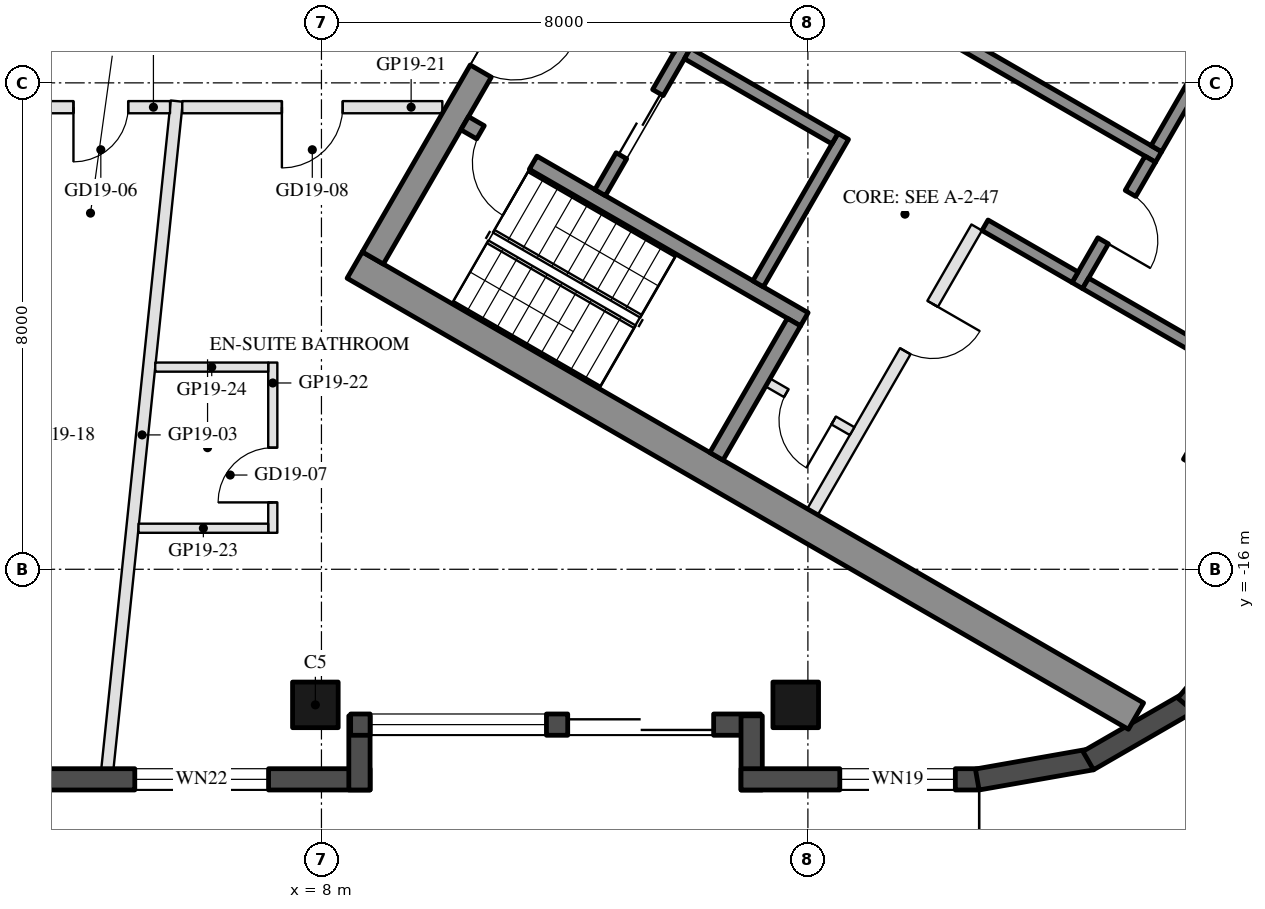
"""IFC4 building model, lengths in metres.
Left out: names, types, materials, properties, quantities, classifications, styles, units other than length and angle.
Written with IfcOpenShell. Run it as: python <this file> out.ifc"""

import sys

from ifc_helpers import new_model, si_unit, direction, frame, frame_2d, origin, origin_2d, place, context, subcontext, project, spatial, rectangle, hollow_rectangle, extrude, element, fill, save


model = new_model("IFC4")
c1 = context("Model", 3, precision=1e-05, world=origin(), true_north=direction((0.0, 1.0)))
c2 = subcontext(c1, "Body", "Model", "MODEL_VIEW")
j1 = project(units=[si_unit("LENGTHUNIT", "METRE"), si_unit("PLANEANGLEUNIT", "RADIAN")], contexts=[c1])
p1 = place(None, origin())
s1 = spatial("IfcSite", under=j1, at=p1, CompositionType="ELEMENT")
p2 = place(p1, origin())
s2 = spatial("IfcBuilding", under=s1, at=p2, CompositionType="ELEMENT")
p3 = place(p2, frame((0.0, 0.0, 205.8)))
s3 = spatial("IfcBuildingStorey", under=s2, at=p3, CompositionType="ELEMENT", Elevation=205.8)
for number, where, z_axis, x_axis in (
    (1, (7.9, -18.23, 0.0), (0.0, 0.0, 1.0), (-1.0, 0.0, 0.0)),
    (2, (15.8, -18.23, 0.0), (0.0, 0.0, 1.0), (-1.0, 0.0, 0.0)),
):
    element("IfcColumn", number, at=place(p3, frame(where, z_axis=z_axis, x_axis=x_axis)), inside=s3, PredefinedType="COLUMN", context=c2, shape_type="SweptSolid", body=[
        extrude(hollow_rectangle(XDim=0.75, YDim=0.75, WallThickness=0.035, at=origin_2d()), origin(), (0.0, 0.0, 1.0), 3.7),
    ])
p4 = place(p3, frame((23.729, -13.7, 0.0), z_axis=(0.0, 0.0, 1.0), x_axis=(0.5, 0.866025403784, 0.0)))
e3 = element("IfcColumn", 3, at=p4, inside=s3, PredefinedType="COLUMN", context=c2, shape_type="SweptSolid", body=[
    extrude(hollow_rectangle(XDim=2.4, YDim=2.2, WallThickness=0.06, at=origin_2d()), origin(), (0.0, 0.0, 1.0), 3.7),
])
p5 = place(p3, frame((-0.9, -19.455, 0.0), z_axis=(0.0, 0.0, 1.0), x_axis=(1.0, 0.0, 0.0)))
e4 = element("IfcWall", 4, at=p5, inside=s3, PredefinedType="SOLIDWALL", context=c2, shape_type="SweptSolid", body=[
    extrude(rectangle(XDim=9.7, YDim=0.35, at=frame_2d((4.85, 0.0))), origin(), (0.0, 0.0, 1.0), 3.55),
])
p6 = place(p5, frame((5.83, 0.0, 0.3)))
e5 = element("IfcOpeningElement", 5, at=p6, cuts=e4, PredefinedType="OPENING", context=c2, shape_type="SweptSolid", body=[
    extrude(rectangle(XDim=2.2, YDim=2.65, at=frame_2d((1.1, 1.325))), frame((0.0, 0.185, 0.0), z_axis=(0.0, -1.0, 0.0), x_axis=(1.0, 0.0, 0.0)), (0.0, 0.0, 1.0), 0.37),
])
p7 = place(p3, frame((8.625, -19.63, 0.0), z_axis=(0.0, 0.0, 1.0), x_axis=(0.0, 1.0, 0.0)))
e6 = element("IfcWall", 6, at=p7, inside=s3, PredefinedType="SOLIDWALL", context=c2, shape_type="SweptSolid", body=[
    extrude(rectangle(XDim=1.22, YDim=0.35, at=frame_2d((0.61, 0.0))), origin(), (0.0, 0.0, 1.0), 3.55),
])
p8 = place(p3, frame((8.48, -18.555, 0.0), z_axis=(0.0, 0.0, 1.0), x_axis=(1.0, 0.0, 0.0)))
e7 = element("IfcWall", 7, at=p8, inside=s3, PredefinedType="SOLIDWALL", context=c2, shape_type="SweptSolid", body=[
    extrude(rectangle(XDim=6.74, YDim=0.35, at=frame_2d((3.37, 0.0))), origin(), (0.0, 0.0, 1.0), 3.55),
])
p9 = place(p8, frame((3.57, 0.0, 0.0)))
e8 = element("IfcOpeningElement", 8, at=p9, cuts=e7, PredefinedType="OPENING", context=c2, shape_type="SweptSolid", body=[
    extrude(rectangle(XDim=2.4, YDim=2.4, at=frame_2d((1.2, 1.2))), frame((0.0, 0.185, 0.0), z_axis=(0.0, -1.0, 0.0), x_axis=(1.0, 0.0, 0.0)), (0.0, 0.0, 1.0), 0.37),
])
p10 = place(p8, frame((0.32, 0.0, 0.3)))
e9 = element("IfcOpeningElement", 9, at=p10, cuts=e7, PredefinedType="OPENING", context=c2, shape_type="SweptSolid", body=[
    extrude(rectangle(XDim=2.9, YDim=2.65, at=frame_2d((1.45, 1.325))), frame((0.0, 0.185, 0.0), z_axis=(0.0, -1.0, 0.0), x_axis=(1.0, 0.0, 0.0)), (0.0, 0.0, 1.0), 0.37),
])
p11 = place(p3, frame((15.075, -18.41, 0.0), z_axis=(0.0, 0.0, 1.0), x_axis=(0.0, -1.0, 0.0)))
e10 = element("IfcWall", 10, at=p11, inside=s3, PredefinedType="SOLIDWALL", context=c2, shape_type="SweptSolid", body=[
    extrude(rectangle(XDim=1.22, YDim=0.35, at=frame_2d((0.61, 0.0))), origin(), (0.0, 0.0, 1.0), 3.55),
])
p12 = place(p3, frame((14.9, -19.455, 0.0), z_axis=(0.0, 0.0, 1.0), x_axis=(1.0, 0.0, 0.0)))
e11 = element("IfcWall", 11, at=p12, inside=s3, PredefinedType="SOLIDWALL", context=c2, shape_type="SweptSolid", body=[
    extrude(rectangle(XDim=3.916, YDim=0.35, at=frame_2d((1.958, 0.0))), origin(), (0.0, 0.0, 1.0), 3.55),
])
p13 = place(p12, frame((1.625, 0.0, 0.3)))
e12 = element("IfcOpeningElement", 12, at=p13, cuts=e11, PredefinedType="OPENING", context=c2, shape_type="SweptSolid", body=[
    extrude(rectangle(XDim=1.9, YDim=2.65, at=frame_2d((0.95, 1.325))), frame((0.0, 0.185, 0.0), z_axis=(0.0, -1.0, 0.0), x_axis=(1.0, 0.0, 0.0)), (0.0, 0.0, 1.0), 0.37),
])
p14 = place(p3, frame((18.785, -19.458, 0.0), z_axis=(0.0, 0.0, 1.0), x_axis=(0.984798995425, 0.173697837091, 0.0)))
e13 = element("IfcWall", 13, at=p14, inside=s3, PredefinedType="SOLIDWALL", context=c2, shape_type="SweptSolid", body=[
    extrude(rectangle(XDim=1.91, YDim=0.35, at=frame_2d((0.955, 0.0))), origin(), (0.0, 0.0, 1.0), 3.55),
])
for number, where, z_axis, x_axis in (
    (14, (20.61, -19.147, 0.0), (0.0, 0.0, 1.0), (0.866, 0.5, 0.0)),
    (15, (22.217, -18.231, 0.0), (0.0, 0.0, 1.0), (0.643, 0.766, 0.0)),
):
    element("IfcWall", number, at=place(p3, frame(where, z_axis=z_axis, x_axis=x_axis)), inside=s3, PredefinedType="SOLIDWALL", context=c2, shape_type="SweptSolid", body=[
        extrude(rectangle(XDim=1.91, YDim=0.35, at=frame_2d((0.955, 0.0))), origin(), (0.0, 0.0, 1.0), 3.55),
    ])
for number, where, z_axis, x_axis in (
    (16, (8.547, -10.997, 0.0), (0.0, 0.0, 1.0), (0.866, -0.5, 0.0)),
    (17, (13.797, -1.903, 0.0), (0.0, 0.0, 1.0), (0.866, -0.5, 0.0)),
):
    element("IfcWall", number, at=place(p3, frame(where, z_axis=z_axis, x_axis=x_axis)), inside=s3, PredefinedType="SHEAR", context=c2, shape_type="SweptSolid", body=[
        extrude(rectangle(XDim=14.837, YDim=0.5, at=frame_2d((7.418, 0.0))), origin(), (0.0, 0.0, 1.0), 3.5),
    ])
p15 = place(p3, frame((8.845, -10.88, 0.0), z_axis=(0.0, 0.0, 1.0), x_axis=(0.500004234368, 0.866022959057, 0.0)))
e18 = element("IfcWall", 18, at=p15, inside=s3, PredefinedType="SHEAR", context=c2, shape_type="SweptSolid", body=[
    extrude(rectangle(XDim=10.0, YDim=0.4, at=frame_2d((5.0, 0.0))), origin(), (0.0, 0.0, 1.0), 3.5),
])
p16 = place(p15, frame((3.55, 0.0, 0.0)))
e19 = element("IfcOpeningElement", 19, at=p16, cuts=e18, PredefinedType="OPENING", context=c2, shape_type="SweptSolid", body=[
    extrude(rectangle(XDim=1.1, YDim=2.1, at=frame_2d((0.55, 1.05))), frame((0.0, 0.21, 0.0), z_axis=(0.0, -1.0, 0.0), x_axis=(1.0, 0.0, 0.0)), (0.0, 0.0, 1.0), 0.42),
])
p17 = place(p15, frame((5.85, 0.0, 0.0)))
e20 = element("IfcOpeningElement", 20, at=p17, cuts=e18, PredefinedType="OPENING", context=c2, shape_type="SweptSolid", body=[
    extrude(rectangle(XDim=1.4, YDim=2.1, at=frame_2d((0.7, 1.05))), frame((0.0, 0.21, 0.0), z_axis=(0.0, -1.0, 0.0), x_axis=(1.0, 0.0, 0.0)), (0.0, 0.0, 1.0), 0.42),
])
p18 = place(p3, frame((10.356, -8.664, 0.0), z_axis=(0.0, 0.0, 1.0), x_axis=(0.866028629588, -0.499994412703, 0.0)))
e21 = element("IfcWall", 21, at=p18, inside=s3, PredefinedType="SHEAR", context=c2, shape_type="SweptSolid", body=[
    extrude(rectangle(XDim=6.45, YDim=0.25, at=frame_2d((3.225, 0.0))), origin(), (0.0, 0.0, 1.0), 3.5),
])
p19 = place(p18, frame((0.3, 0.0, 0.0)))
e22 = element("IfcOpeningElement", 22, at=p19, cuts=e21, PredefinedType="OPENING", context=c2, shape_type="SweptSolid", body=[
    extrude(rectangle(XDim=1.0, YDim=2.1, at=frame_2d((0.5, 1.05))), frame((0.0, 0.135, 0.0), z_axis=(0.0, -1.0, 0.0), x_axis=(1.0, 0.0, 0.0)), (0.0, 0.0, 1.0), 0.27),
])
p20 = place(p3, frame((14.496, -14.143, 0.0), z_axis=(0.0, 0.0, 1.0), x_axis=(0.500062241894, 0.865989465428, 0.0)))
e23 = element("IfcWall", 23, at=p20, inside=s3, PredefinedType="SHEAR", context=c2, shape_type="SweptSolid", body=[
    extrude(rectangle(XDim=2.55, YDim=0.25, at=frame_2d((1.275, 0.0))), origin(), (0.0, 0.0, 1.0), 3.5),
])
p21 = place(p3, frame((15.181, -11.305, 0.0), z_axis=(0.0, 0.0, 1.0), x_axis=(0.49994636267, 0.866056369097, 0.0)))
e24 = element("IfcWall", 24, at=p21, inside=s3, PredefinedType="SHEAR", context=c2, shape_type="SweptSolid", body=[
    extrude(rectangle(XDim=2.8, YDim=0.2, at=frame_2d((1.4, 0.0))), origin(), (0.0, 0.0, 1.0), 3.5),
])
p22 = place(p3, frame((12.583, -9.805, 0.0), z_axis=(0.0, 0.0, 1.0), x_axis=(0.49994636267, 0.866056369097, 0.0)))
e25 = element("IfcWall", 25, at=p22, inside=s3, PredefinedType="SHEAR", context=c2, shape_type="SweptSolid", body=[
    extrude(rectangle(XDim=2.8, YDim=0.2, at=frame_2d((1.4, 0.0))), origin(), (0.0, 0.0, 1.0), 3.5),
])
p23 = place(p22, frame((0.7, 0.0, 0.0)))
e26 = element("IfcOpeningElement", 26, at=p23, cuts=e25, PredefinedType="OPENING", context=c2, shape_type="SweptSolid", body=[
    extrude(rectangle(XDim=1.2, YDim=2.1, at=frame_2d((0.6, 1.05))), frame((0.0, 0.11, 0.0), z_axis=(0.0, -1.0, 0.0), x_axis=(1.0, 0.0, 0.0)), (0.0, 0.0, 1.0), 0.22),
])
p24 = place(p3, frame((11.768, -6.217, 0.0), z_axis=(0.0, 0.0, 1.0), x_axis=(0.866050077142, -0.499957262057, 0.0)))
e27 = element("IfcWall", 27, at=p24, inside=s3, PredefinedType="SHEAR", context=c2, shape_type="SweptSolid", body=[
    extrude(rectangle(XDim=2.4, YDim=0.2, at=frame_2d((1.2, 0.0))), origin(), (0.0, 0.0, 1.0), 3.5),
])
p25 = place(p3, frame((14.02, -7.517, 0.0), z_axis=(0.0, 0.0, 1.0), x_axis=(0.866034573852, -0.49998411664, 0.0)))
e28 = element("IfcWall", 28, at=p25, inside=s3, PredefinedType="SHEAR", context=c2, shape_type="SweptSolid", body=[
    extrude(rectangle(XDim=2.8, YDim=0.2, at=frame_2d((1.4, 0.0))), origin(), (0.0, 0.0, 1.0), 3.5),
])
p26 = place(p3, frame((12.968, -4.138, 0.0), z_axis=(0.0, 0.0, 1.0), x_axis=(0.866028328073, -0.49999493495, 0.0)))
e29 = element("IfcWall", 29, at=p26, inside=s3, PredefinedType="SHEAR", context=c2, shape_type="SweptSolid", body=[
    extrude(rectangle(XDim=10.16, YDim=0.2, at=frame_2d((5.08, 0.0))), origin(), (0.0, 0.0, 1.0), 3.5),
])
p27 = place(p26, frame((4.53, 0.0, 0.0)))
e30 = element("IfcOpeningElement", 30, at=p27, cuts=e29, PredefinedType="OPENING", context=c2, shape_type="SweptSolid", body=[
    extrude(rectangle(XDim=0.9, YDim=2.1, at=frame_2d((0.45, 1.05))), frame((0.0, 0.11, 0.0), z_axis=(0.0, -1.0, 0.0), x_axis=(1.0, 0.0, 0.0)), (0.0, 0.0, 1.0), 0.22),
])
p28 = place(p3, frame((20.43, -11.333, 0.0), z_axis=(0.0, 0.0, 1.0), x_axis=(0.500001309137, 0.866024647952, 0.0)))
e31 = element("IfcWall", 31, at=p28, inside=s3, PredefinedType="SHEAR", context=c2, shape_type="SweptSolid", body=[
    extrude(rectangle(XDim=2.4, YDim=0.2, at=frame_2d((1.2, 0.0))), origin(), (0.0, 0.0, 1.0), 3.5),
])
p29 = place(p28, frame((0.85, 0.0, 0.0)))
e32 = element("IfcOpeningElement", 32, at=p29, cuts=e31, PredefinedType="OPENING", context=c2, shape_type="SweptSolid", body=[
    extrude(rectangle(XDim=0.9, YDim=2.1, at=frame_2d((0.45, 1.05))), frame((0.0, 0.11, 0.0), z_axis=(0.0, -1.0, 0.0), x_axis=(1.0, 0.0, 0.0)), (0.0, 0.0, 1.0), 0.22),
])
p30 = place(p3, frame((18.913, -10.342, 0.0), z_axis=(0.0, 0.0, 1.0), x_axis=(0.866038183914, -0.499977863513, 0.0)))
e33 = element("IfcWall", 33, at=p30, inside=s3, PredefinedType="SHEAR", context=c2, shape_type="SweptSolid", body=[
    extrude(rectangle(XDim=1.71, YDim=0.2, at=frame_2d((0.855, 0.0))), origin(), (0.0, 0.0, 1.0), 3.5),
])
p31 = place(p3, frame((21.73, -9.082, 0.0), z_axis=(0.0, 0.0, 1.0), x_axis=(0.50002537861, 0.866010750942, 0.0)))
e34 = element("IfcWall", 34, at=p31, inside=s3, PredefinedType="SHEAR", context=c2, shape_type="SweptSolid", body=[
    extrude(rectangle(XDim=2.0, YDim=0.2, at=frame_2d((1.0, 0.0))), origin(), (0.0, 0.0, 1.0), 3.5),
])
p32 = place(p3, frame((20.567, -11.297, 0.0), z_axis=(0.0, 0.0, 1.0), x_axis=(0.866055327414, -0.49994816717, 0.0)))
e35 = element("IfcWall", 35, at=p32, inside=s3, PredefinedType="SHEAR", context=c2, shape_type="SweptSolid", body=[
    extrude(rectangle(XDim=2.84, YDim=0.2, at=frame_2d((1.42, 0.0))), origin(), (0.0, 0.0, 1.0), 3.5),
])
p33 = place(p3, frame((16.076, -15.055, 0.0), z_axis=(0.0, 0.0, 1.0), x_axis=(0.499995103361, 0.866028230842, 0.0)))
e36 = element("IfcWall", 36, at=p33, inside=s3, PredefinedType="PARTITIONING", context=c2, shape_type="SweptSolid", body=[
    extrude(rectangle(XDim=5.4, YDim=0.2, at=frame_2d((2.7, 0.0))), origin(), (0.0, 0.0, 1.0), 3.5),
])
p34 = place(p33, frame((3.05, 0.0, 0.0)))
e37 = element("IfcOpeningElement", 37, at=p34, cuts=e36, PredefinedType="OPENING", context=c2, shape_type="SweptSolid", body=[
    extrude(rectangle(XDim=0.9, YDim=2.1, at=frame_2d((0.45, 1.05))), frame((0.0, 0.11, 0.0), z_axis=(0.0, -1.0, 0.0), x_axis=(1.0, 0.0, 0.0)), (0.0, 0.0, 1.0), 0.22),
])
p35 = place(p3, frame((15.342, -12.928, 0.0), z_axis=(0.0, 0.0, 1.0), x_axis=(0.865989903783, -0.500061482766, 0.0)))
e38 = element("IfcWall", 38, at=p35, inside=s3, PredefinedType="PARTITIONING", context=c2, shape_type="SweptSolid", body=[
    extrude(rectangle(XDim=1.6, YDim=0.15, at=frame_2d((0.8, 0.0))), origin(), (0.0, 0.0, 1.0), 3.5),
])
p36 = place(p35, frame((0.35, 0.0, 0.0)))
e39 = element("IfcOpeningElement", 39, at=p36, cuts=e38, PredefinedType="OPENING", context=c2, shape_type="SweptSolid", body=[
    extrude(rectangle(XDim=0.9, YDim=2.1, at=frame_2d((0.45, 1.05))), frame((0.0, 0.085, 0.0), z_axis=(0.0, -1.0, 0.0), x_axis=(1.0, 0.0, 0.0)), (0.0, 0.0, 1.0), 0.17),
])
p37 = place(p3, frame((4.48, -19.28, 0.0), z_axis=(0.0, 0.0, 1.0), x_axis=(0.103348095524, 0.994645248896, 0.0)))
e40 = element("IfcWall", 40, at=p37, inside=s3, PredefinedType="PARTITIONING", context=c2, shape_type="SweptSolid", body=[
    extrude(rectangle(XDim=11.039, YDim=0.2, at=frame_2d((5.52, 0.0))), origin(), (0.0, 0.0, 1.0), 3.06),
])
p38 = place(p3, frame((5.51, -8.4, 0.0), z_axis=(0.0, 0.0, 1.0), x_axis=(-1.0, 0.0, 0.0)))
e41 = element("IfcWall", 41, at=p38, inside=s3, PredefinedType="PARTITIONING", context=c2, shape_type="SweptSolid", body=[
    extrude(rectangle(XDim=2.277, YDim=0.2, at=frame_2d((1.138, 0.0))), origin(), (0.0, 0.0, 1.0), 2.95),
])
p39 = place(p38, frame((0.688, 0.0, 0.0)))
e42 = element("IfcOpeningElement", 42, at=p39, cuts=e41, PredefinedType="OPENING", context=c2, shape_type="SweptSolid", body=[
    extrude(rectangle(XDim=0.9, YDim=2.1, at=frame_2d((0.45, 1.05))), frame((0.0, 0.11, 0.0), z_axis=(0.0, -1.0, 0.0), x_axis=(1.0, 0.0, 0.0)), (0.0, 0.0, 1.0), 0.22),
])
p40 = place(p3, frame((9.988, -8.4, 0.0), z_axis=(0.0, 0.0, 1.0), x_axis=(-1.0, 0.0, 0.0)))
e43 = element("IfcWall", 43, at=p40, inside=s3, PredefinedType="PARTITIONING", context=c2, shape_type="SweptSolid", body=[
    extrude(rectangle(XDim=4.277, YDim=0.2, at=frame_2d((2.139, 0.0))), origin(), (0.0, 0.0, 1.0), 2.95),
])
p41 = place(p40, frame((1.639, 0.0, 0.0)))
e44 = element("IfcOpeningElement", 44, at=p41, cuts=e43, PredefinedType="OPENING", context=c2, shape_type="SweptSolid", body=[
    extrude(rectangle(XDim=1.0, YDim=2.1, at=frame_2d((0.5, 1.05))), frame((0.0, 0.11, 0.0), z_axis=(0.0, -1.0, 0.0), x_axis=(1.0, 0.0, 0.0)), (0.0, 0.0, 1.0), 0.22),
])
p42 = place(p3, frame((7.2, -15.4, 0.0), z_axis=(0.0, 0.0, 1.0), x_axis=(0.0, 1.0, 0.0)))
e45 = element("IfcWall", 45, at=p42, inside=s3, PredefinedType="PARTITIONING", context=c2, shape_type="SweptSolid", body=[
    extrude(rectangle(XDim=2.8, YDim=0.15, at=frame_2d((1.4, 0.0))), origin(), (0.0, 0.0, 1.0), 3.55),
])
p43 = place(p42, frame((0.5, 0.0, 0.0)))
e46 = element("IfcOpeningElement", 46, at=p43, cuts=e45, PredefinedType="OPENING", context=c2, shape_type="SweptSolid", body=[
    extrude(rectangle(XDim=0.9, YDim=2.1, at=frame_2d((0.45, 1.05))), frame((0.0, 0.085, 0.0), z_axis=(0.0, -1.0, 0.0), x_axis=(1.0, 0.0, 0.0)), (0.0, 0.0, 1.0), 0.17),
])
p44 = place(p3, frame((4.991, -15.325, 0.0), z_axis=(0.0, 0.0, 1.0), x_axis=(1.0, 0.0, 0.0)))
e47 = element("IfcWall", 47, at=p44, inside=s3, PredefinedType="PARTITIONING", context=c2, shape_type="SweptSolid", body=[
    extrude(rectangle(XDim=2.133, YDim=0.15, at=frame_2d((1.066, 0.0))), origin(), (0.0, 0.0, 1.0), 3.55),
])
p45 = place(p3, frame((5.267, -12.675, 0.0), z_axis=(0.0, 0.0, 1.0), x_axis=(1.0, 0.0, 0.0)))
e48 = element("IfcWall", 48, at=p45, inside=s3, PredefinedType="PARTITIONING", context=c2, shape_type="SweptSolid", body=[
    extrude(rectangle(XDim=1.858, YDim=0.15, at=frame_2d((0.929, 0.0))), origin(), (0.0, 0.0, 1.0), 3.55),
])
p46 = place(p6, origin())
e49 = element("IfcWindow", 49, at=p46, inside=s3, PartitioningType="SINGLE_PANEL", PredefinedType="WINDOW", context=c2, shape_type="SweptSolid", body=[
    extrude(rectangle(XDim=2.2, YDim=2.65, at=frame_2d((1.1, 1.325))), frame((0.0, 0.03, 0.0), z_axis=(0.0, -1.0, 0.0), x_axis=(1.0, 0.0, 0.0)), (0.0, 0.0, 1.0), 0.06),
])
fill(e5, e49)
p47 = place(p9, frame((2.4, 0.0, 0.0), z_axis=(0.0, 0.0, 1.0), x_axis=(-1.0, 0.0, 0.0)))
e50 = element("IfcDoor", 50, at=p47, inside=s3, OperationType="SLIDING_TO_LEFT", PredefinedType="DOOR", context=c2, shape_type="SweptSolid", body=[
    extrude(rectangle(XDim=2.4, YDim=2.4, at=frame_2d((1.2, 1.2))), frame((0.0, 0.025, 0.0), z_axis=(0.0, -1.0, 0.0), x_axis=(1.0, 0.0, 0.0)), (0.0, 0.0, 1.0), 0.05),
])
fill(e8, e50)
p48 = place(p10, origin())
e51 = element("IfcWindow", 51, at=p48, inside=s3, PartitioningType="SINGLE_PANEL", PredefinedType="WINDOW", context=c2, shape_type="SweptSolid", body=[
    extrude(rectangle(XDim=2.9, YDim=2.65, at=frame_2d((1.45, 1.325))), frame((0.0, 0.03, 0.0), z_axis=(0.0, -1.0, 0.0), x_axis=(1.0, 0.0, 0.0)), (0.0, 0.0, 1.0), 0.06),
])
fill(e9, e51)
p49 = place(p13, origin())
e52 = element("IfcWindow", 52, at=p49, inside=s3, PartitioningType="SINGLE_PANEL", PredefinedType="WINDOW", context=c2, shape_type="SweptSolid", body=[
    extrude(rectangle(XDim=1.9, YDim=2.65, at=frame_2d((0.95, 1.325))), frame((0.0, 0.03, 0.0), z_axis=(0.0, -1.0, 0.0), x_axis=(1.0, 0.0, 0.0)), (0.0, 0.0, 1.0), 0.06),
])
fill(e12, e52)
p50 = place(p23, origin())
e53 = element("IfcDoor", 53, at=p50, inside=s3, OperationType="DOUBLE_DOOR_SLIDING", PredefinedType="DOOR", context=c2, shape_type="SweptSolid", body=[
    extrude(rectangle(XDim=1.2, YDim=2.1, at=frame_2d((0.6, 1.05))), frame((0.0, 0.025, 0.0), z_axis=(0.0, -1.0, 0.0), x_axis=(1.0, 0.0, 0.0)), (0.0, 0.0, 1.0), 0.05),
])
fill(e26, e53)
p51 = place(p36, frame((0.9, 0.0, 0.0), z_axis=(0.0, 0.0, 1.0), x_axis=(-1.0, 0.0, 0.0)))
e54 = element("IfcDoor", 54, at=p51, inside=s3, OperationType="SINGLE_SWING_LEFT", PredefinedType="DOOR", context=c2, shape_type="SweptSolid", body=[
    extrude(rectangle(XDim=0.9, YDim=2.1, at=frame_2d((0.45, 1.05))), frame((0.0, 0.025, 0.0), z_axis=(0.0, -1.0, 0.0), x_axis=(1.0, 0.0, 0.0)), (0.0, 0.0, 1.0), 0.05),
])
fill(e39, e54)
p52 = place(p29, frame((0.9, 0.0, 0.0), z_axis=(0.0, 0.0, 1.0), x_axis=(-1.0, 0.0, 0.0)))
e55 = element("IfcDoor", 55, at=p52, inside=s3, OperationType="SINGLE_SWING_RIGHT", PredefinedType="DOOR", context=c2, shape_type="SweptSolid", body=[
    extrude(rectangle(XDim=0.9, YDim=2.1, at=frame_2d((0.45, 1.05))), frame((0.0, 0.025, 0.0), z_axis=(0.0, -1.0, 0.0), x_axis=(1.0, 0.0, 0.0)), (0.0, 0.0, 1.0), 0.05),
])
fill(e32, e55)
p53 = place(p34, frame((0.9, 0.0, 0.0), z_axis=(0.0, 0.0, 1.0), x_axis=(-1.0, 0.0, 0.0)))
e56 = element("IfcDoor", 56, at=p53, inside=s3, OperationType="SINGLE_SWING_LEFT", PredefinedType="DOOR", context=c2, shape_type="SweptSolid", body=[
    extrude(rectangle(XDim=0.9, YDim=2.1, at=frame_2d((0.45, 1.05))), frame((0.0, 0.025, 0.0), z_axis=(0.0, -1.0, 0.0), x_axis=(1.0, 0.0, 0.0)), (0.0, 0.0, 1.0), 0.05),
])
fill(e37, e56)
p54 = place(p16, frame((1.1, 0.0, 0.0), z_axis=(0.0, 0.0, 1.0), x_axis=(-1.0, 0.0, 0.0)))
e57 = element("IfcDoor", 57, at=p54, inside=s3, OperationType="SINGLE_SWING_LEFT", PredefinedType="DOOR", context=c2, shape_type="SweptSolid", body=[
    extrude(rectangle(XDim=1.1, YDim=2.1, at=frame_2d((0.55, 1.05))), frame((0.0, 0.025, 0.0), z_axis=(0.0, -1.0, 0.0), x_axis=(1.0, 0.0, 0.0)), (0.0, 0.0, 1.0), 0.05),
])
fill(e19, e57)
p55 = place(p19, frame((1.0, 0.0, 0.0), z_axis=(0.0, 0.0, 1.0), x_axis=(-1.0, 0.0, 0.0)))
e58 = element("IfcDoor", 58, at=p55, inside=s3, OperationType="SINGLE_SWING_LEFT", PredefinedType="DOOR", context=c2, shape_type="SweptSolid", body=[
    extrude(rectangle(XDim=1.0, YDim=2.1, at=frame_2d((0.5, 1.05))), frame((0.0, 0.025, 0.0), z_axis=(0.0, -1.0, 0.0), x_axis=(1.0, 0.0, 0.0)), (0.0, 0.0, 1.0), 0.05),
])
fill(e22, e58)
p56 = place(p39, origin())
e59 = element("IfcDoor", 59, at=p56, inside=s3, OperationType="SINGLE_SWING_RIGHT", PredefinedType="DOOR", context=c2, shape_type="SweptSolid", body=[
    extrude(rectangle(XDim=0.9, YDim=2.1, at=frame_2d((0.45, 1.05))), frame((0.0, 0.025, 0.0), z_axis=(0.0, -1.0, 0.0), x_axis=(1.0, 0.0, 0.0)), (0.0, 0.0, 1.0), 0.05),
])
fill(e42, e59)
p57 = place(p43, origin())
e60 = element("IfcDoor", 60, at=p57, inside=s3, OperationType="SINGLE_SWING_LEFT", PredefinedType="DOOR", context=c2, shape_type="SweptSolid", body=[
    extrude(rectangle(XDim=0.9, YDim=2.1, at=frame_2d((0.45, 1.05))), frame((0.0, 0.025, 0.0), z_axis=(0.0, -1.0, 0.0), x_axis=(1.0, 0.0, 0.0)), (0.0, 0.0, 1.0), 0.05),
])
fill(e46, e60)
p58 = place(p41, origin())
e61 = element("IfcDoor", 61, at=p58, inside=s3, OperationType="SINGLE_SWING_RIGHT", PredefinedType="DOOR", context=c2, shape_type="SweptSolid", body=[
    extrude(rectangle(XDim=1.0, YDim=2.1, at=frame_2d((0.5, 1.05))), frame((0.0, 0.025, 0.0), z_axis=(0.0, -1.0, 0.0), x_axis=(1.0, 0.0, 0.0)), (0.0, 0.0, 1.0), 0.05),
])
fill(e44, e61)
save(model, sys.argv[1])
